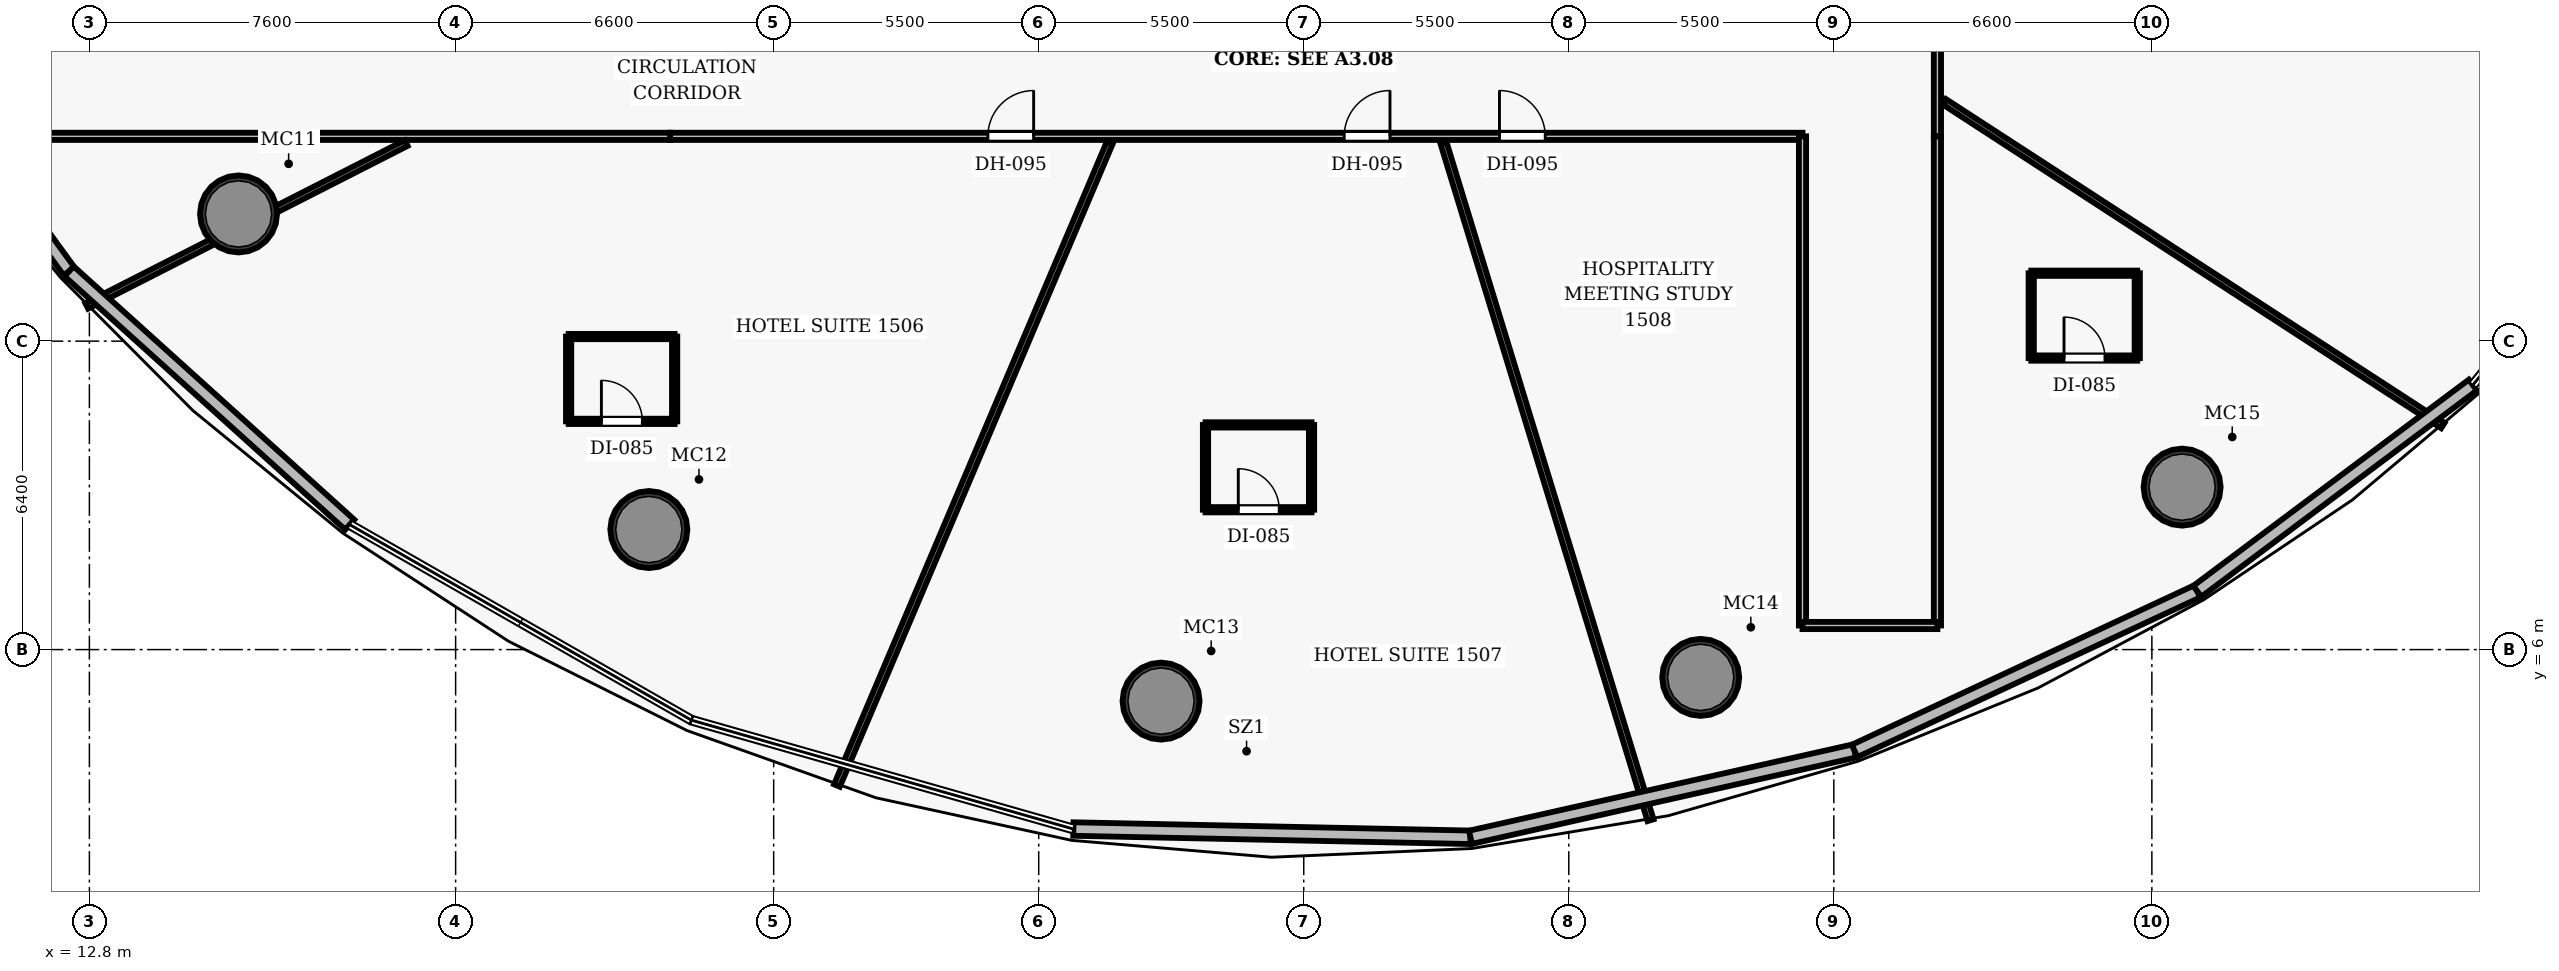
"""IFC4 building model, lengths in metres.
Left out: names, types, materials, properties, quantities, classifications, styles, units other than length and angle.
Written with IfcOpenShell. Run it as: python <this file> out.ifc"""

import sys

from ifc_helpers import new_model, si_unit, direction, frame, frame_2d, origin, origin_2d, place, context, subcontext, project, spatial, rectangle, hollow_circle, extrude, element, fill, save


model = new_model("IFC4")
c1 = context("Model", 3, precision=1e-05, world=origin(), true_north=direction((0.0, 1.0)))
c2 = subcontext(c1, "Body", "Model", "MODEL_VIEW")
j1 = project(units=[si_unit("LENGTHUNIT", "METRE"), si_unit("PLANEANGLEUNIT", "RADIAN")], contexts=[c1])
p1 = place(None, origin())
s1 = spatial("IfcSite", under=j1, at=p1, CompositionType="ELEMENT")
p2 = place(p1, origin())
s2 = spatial("IfcBuilding", under=s1, at=p2, CompositionType="ELEMENT")
p3 = place(p2, frame((0.0, 0.0, 69.4)))
s3 = spatial("IfcBuildingStorey", under=s2, at=p3, CompositionType="ELEMENT", Elevation=69.4)
for number, where, z_axis, x_axis in (
    (1, (15.895, 15.04, 0.0), (0.0, 0.0, 1.0), (1.0, 0.0, 0.0)),
    (2, (24.41, 8.491, 0.0), (0.0, 0.0, 1.0), (1.0, 0.0, 0.0)),
    (3, (35.039, 4.931, 0.0), (0.0, 0.0, 1.0), (1.0, 0.0, 0.0)),
    (4, (46.238, 5.423, 0.0), (0.0, 0.0, 1.0), (1.0, 0.0, 0.0)),
    (5, (56.228, 9.371, 0.0), (0.0, 0.0, 1.0), (1.0, 0.0, 0.0)),
):
    element("IfcColumn", number, at=place(p3, frame(where, z_axis=z_axis, x_axis=x_axis)), inside=s3, PredefinedType="COLUMN", context=c2, shape_type="SweptSolid", body=[
        extrude(hollow_circle(Radius=0.8, WallThickness=0.06, at=origin_2d()), origin(), (0.0, 0.0, 1.0), 3.5),
    ])
p4 = place(p3, frame((24.85, 16.65, 0.0), z_axis=(0.0, 0.0, 1.0), x_axis=(1.0, 0.0, 0.0)))
e6 = element("IfcWall", 6, at=p4, inside=s3, PredefinedType="PARTITIONING", context=c2, shape_type="SweptSolid", body=[
    extrude(rectangle(XDim=23.5, YDim=0.15, at=frame_2d((11.75, 0.0))), origin(), (0.0, 0.0, 1.0), 2.6),
])
p5 = place(p4, frame((6.595, 0.0, 0.0)))
e7 = element("IfcOpeningElement", 7, at=p5, cuts=e6, PredefinedType="OPENING", context=c2, shape_type="SweptSolid", body=[
    extrude(rectangle(XDim=0.95, YDim=2.15, at=frame_2d((0.475, 1.075))), frame((0.0, 0.085, 0.0), z_axis=(0.0, -1.0, 0.0), x_axis=(1.0, 0.0, 0.0)), (0.0, 0.0, 1.0), 0.17),
])
p6 = place(p4, frame((13.99, 0.0, 0.0)))
e8 = element("IfcOpeningElement", 8, at=p6, cuts=e6, PredefinedType="OPENING", context=c2, shape_type="SweptSolid", body=[
    extrude(rectangle(XDim=0.95, YDim=2.15, at=frame_2d((0.475, 1.075))), frame((0.0, 0.085, 0.0), z_axis=(0.0, -1.0, 0.0), x_axis=(1.0, 0.0, 0.0)), (0.0, 0.0, 1.0), 0.17),
])
p7 = place(p4, frame((17.211, 0.0, 0.0)))
e9 = element("IfcOpeningElement", 9, at=p7, cuts=e6, PredefinedType="OPENING", context=c2, shape_type="SweptSolid", body=[
    extrude(rectangle(XDim=0.95, YDim=2.15, at=frame_2d((0.475, 1.075))), frame((0.0, 0.085, 0.0), z_axis=(0.0, -1.0, 0.0), x_axis=(1.0, 0.0, 0.0)), (0.0, 0.0, 1.0), 0.17),
])
p8 = place(p3, frame((51.15, 16.65, 0.0), z_axis=(0.0, 0.0, 1.0), x_axis=(0.0, 1.0, 0.0)))
e10 = element("IfcWall", 10, at=p8, inside=s3, PredefinedType="PARTITIONING", context=c2, shape_type="SweptSolid", body=[
    extrude(rectangle(XDim=15.9, YDim=0.15, at=frame_2d((7.95, 0.0))), origin(), (0.0, 0.0, 1.0), 2.6),
])
p9 = place(p8, frame((11.512, 0.0, 0.0)))
e11 = element("IfcOpeningElement", 11, at=p9, cuts=e10, PredefinedType="OPENING", context=c2, shape_type="SweptSolid", body=[
    extrude(rectangle(XDim=0.95, YDim=2.15, at=frame_2d((0.475, 1.075))), frame((0.0, 0.085, 0.0), z_axis=(0.0, -1.0, 0.0), x_axis=(1.0, 0.0, 0.0)), (0.0, 0.0, 1.0), 0.17),
])
p10 = place(p8, frame((7.004, 0.0, 0.0)))
e12 = element("IfcOpeningElement", 12, at=p10, cuts=e10, PredefinedType="OPENING", context=c2, shape_type="SweptSolid", body=[
    extrude(rectangle(XDim=0.95, YDim=2.15, at=frame_2d((0.475, 1.075))), frame((0.0, 0.085, 0.0), z_axis=(0.0, -1.0, 0.0), x_axis=(1.0, 0.0, 0.0)), (0.0, 0.0, 1.0), 0.17),
])
p11 = place(p3, frame((10.948, 16.65, 0.0), z_axis=(0.0, 0.0, 1.0), x_axis=(1.0, 0.0, 0.0)))
e13 = element("IfcWall", 13, at=p11, inside=s3, PredefinedType="PARTITIONING", context=c2, shape_type="SweptSolid", body=[
    extrude(rectangle(XDim=13.902, YDim=0.15, at=frame_2d((6.951, 0.0))), origin(), (0.0, 0.0, 1.0), 2.6),
])
for number, where, z_axis, x_axis in (
    (14, (48.35, 6.5, 0.0), (0.0, 0.0, 1.0), (0.0, 1.0, 0.0)),
    (15, (51.15, 6.5, 0.0), (0.0, 0.0, 1.0), (0.0, 1.0, 0.0)),
):
    element("IfcWall", number, at=place(p3, frame(where, z_axis=z_axis, x_axis=x_axis)), inside=s3, PredefinedType="PARTITIONING", context=c2, shape_type="SweptSolid", body=[
        extrude(rectangle(XDim=10.15, YDim=0.15, at=frame_2d((5.075, 0.0))), origin(), (0.0, 0.0, 1.0), 2.6),
    ])
p12 = place(p3, frame((48.35, 6.5, 0.0), z_axis=(0.0, 0.0, 1.0), x_axis=(1.0, 0.0, 0.0)))
e16 = element("IfcWall", 16, at=p12, inside=s3, PredefinedType="PARTITIONING", context=c2, shape_type="SweptSolid", body=[
    extrude(rectangle(XDim=2.8, YDim=0.15, at=frame_2d((1.4, 0.0))), origin(), (0.0, 0.0, 1.0), 2.6),
])
p13 = place(p3, frame((19.375, 16.51, 0.0), z_axis=(0.0, 0.0, 1.0), x_axis=(-0.891002691838, -0.453998021073, 0.0)))
e17 = element("IfcWall", 17, at=p13, inside=s3, PredefinedType="PARTITIONING", context=c2, shape_type="SweptSolid", body=[
    extrude(rectangle(XDim=7.442, YDim=0.13, at=frame_2d((3.721, 0.0))), origin(), (0.0, 0.0, 1.0), 2.6),
])
p14 = place(p3, frame((33.972, 16.51, 0.0), z_axis=(0.0, 0.0, 1.0), x_axis=(-0.390724738728, -0.920507565719, 0.0)))
e18 = element("IfcWall", 18, at=p14, inside=s3, PredefinedType="PARTITIONING", context=c2, shape_type="SweptSolid", body=[
    extrude(rectangle(XDim=14.483, YDim=0.13, at=frame_2d((7.241, 0.0))), origin(), (0.0, 0.0, 1.0), 2.6),
])
p15 = place(p3, frame((40.901, 16.51, 0.0), z_axis=(0.0, 0.0, 1.0), x_axis=(0.292374733108, -0.956303830087, 0.0)))
e19 = element("IfcWall", 19, at=p15, inside=s3, PredefinedType="PARTITIONING", context=c2, shape_type="SweptSolid", body=[
    extrude(rectangle(XDim=14.692, YDim=0.13, at=frame_2d((7.346, 0.0))), origin(), (0.0, 0.0, 1.0), 2.6),
])
p16 = place(p3, frame((51.29, 17.369, 0.0), z_axis=(0.0, 0.0, 1.0), x_axis=(0.838662335308, -0.544651711955, 0.0)))
e20 = element("IfcWall", 20, at=p16, inside=s3, PredefinedType="PARTITIONING", context=c2, shape_type="SweptSolid", body=[
    extrude(rectangle(XDim=12.339, YDim=0.13, at=frame_2d((6.17, 0.0))), origin(), (0.0, 0.0, 1.0), 2.6),
])
p17 = place(p3, frame((22.745, 10.736, 0.0), z_axis=(0.0, 0.0, 1.0), x_axis=(1.0, 0.0, 0.0)))
e21 = element("IfcWall", 21, at=p17, inside=s3, PredefinedType="PARTITIONING", context=c2, shape_type="SweptSolid", body=[
    extrude(rectangle(XDim=2.2, YDim=0.11, at=frame_2d((1.1, 0.0))), origin(), (0.0, 0.0, 1.0), 2.6),
])
p18 = place(p17, frame((0.68, 0.0, 0.0)))
e22 = element("IfcOpeningElement", 22, at=p18, cuts=e21, PredefinedType="OPENING", context=c2, shape_type="SweptSolid", body=[
    extrude(rectangle(XDim=0.85, YDim=2.1, at=frame_2d((0.425, 1.05))), frame((0.0, 0.065, 0.0), z_axis=(0.0, -1.0, 0.0), x_axis=(1.0, 0.0, 0.0)), (0.0, 0.0, 1.0), 0.13),
])
p19 = place(p3, frame((22.745, 12.496, 0.0), z_axis=(0.0, 0.0, 1.0), x_axis=(1.0, 0.0, 0.0)))
e23 = element("IfcWall", 23, at=p19, inside=s3, PredefinedType="PARTITIONING", context=c2, shape_type="SweptSolid", body=[
    extrude(rectangle(XDim=2.2, YDim=0.11, at=frame_2d((1.1, 0.0))), origin(), (0.0, 0.0, 1.0), 2.6),
])
for number, where, z_axis, x_axis in (
    (24, (22.745, 10.736, 0.0), (0.0, 0.0, 1.0), (0.0, 1.0, 0.0)),
    (25, (24.945, 10.736, 0.0), (0.0, 0.0, 1.0), (0.0, 1.0, 0.0)),
):
    element("IfcWall", number, at=place(p3, frame(where, z_axis=z_axis, x_axis=x_axis)), inside=s3, PredefinedType="PARTITIONING", context=c2, shape_type="SweptSolid", body=[
        extrude(rectangle(XDim=1.76, YDim=0.11, at=frame_2d((0.88, 0.0))), origin(), (0.0, 0.0, 1.0), 2.6),
    ])
p20 = place(p3, frame((35.961, 8.902, 0.0), z_axis=(0.0, 0.0, 1.0), x_axis=(1.0, 0.0, 0.0)))
e26 = element("IfcWall", 26, at=p20, inside=s3, PredefinedType="PARTITIONING", context=c2, shape_type="SweptSolid", body=[
    extrude(rectangle(XDim=2.2, YDim=0.11, at=frame_2d((1.1, 0.0))), origin(), (0.0, 0.0, 1.0), 2.6),
])
p21 = place(p20, frame((0.68, 0.0, 0.0)))
e27 = element("IfcOpeningElement", 27, at=p21, cuts=e26, PredefinedType="OPENING", context=c2, shape_type="SweptSolid", body=[
    extrude(rectangle(XDim=0.85, YDim=2.1, at=frame_2d((0.425, 1.05))), frame((0.0, 0.065, 0.0), z_axis=(0.0, -1.0, 0.0), x_axis=(1.0, 0.0, 0.0)), (0.0, 0.0, 1.0), 0.13),
])
p22 = place(p3, frame((35.961, 10.662, 0.0), z_axis=(0.0, 0.0, 1.0), x_axis=(1.0, 0.0, 0.0)))
e28 = element("IfcWall", 28, at=p22, inside=s3, PredefinedType="PARTITIONING", context=c2, shape_type="SweptSolid", body=[
    extrude(rectangle(XDim=2.2, YDim=0.11, at=frame_2d((1.1, 0.0))), origin(), (0.0, 0.0, 1.0), 2.6),
])
for number, where, z_axis, x_axis in (
    (29, (35.961, 8.902, 0.0), (0.0, 0.0, 1.0), (0.0, 1.0, 0.0)),
    (30, (38.162, 8.902, 0.0), (0.0, 0.0, 1.0), (0.0, 1.0, 0.0)),
):
    element("IfcWall", number, at=place(p3, frame(where, z_axis=z_axis, x_axis=x_axis)), inside=s3, PredefinedType="PARTITIONING", context=c2, shape_type="SweptSolid", body=[
        extrude(rectangle(XDim=1.76, YDim=0.11, at=frame_2d((0.88, 0.0))), origin(), (0.0, 0.0, 1.0), 2.6),
    ])
p23 = place(p3, frame((53.097, 12.049, 0.0), z_axis=(0.0, 0.0, 1.0), x_axis=(1.0, 0.0, 0.0)))
e31 = element("IfcWall", 31, at=p23, inside=s3, PredefinedType="PARTITIONING", context=c2, shape_type="SweptSolid", body=[
    extrude(rectangle(XDim=2.2, YDim=0.11, at=frame_2d((1.1, 0.0))), origin(), (0.0, 0.0, 1.0), 2.6),
])
p24 = place(p23, frame((0.68, 0.0, 0.0)))
e32 = element("IfcOpeningElement", 32, at=p24, cuts=e31, PredefinedType="OPENING", context=c2, shape_type="SweptSolid", body=[
    extrude(rectangle(XDim=0.85, YDim=2.1, at=frame_2d((0.425, 1.05))), frame((0.0, 0.065, 0.0), z_axis=(0.0, -1.0, 0.0), x_axis=(1.0, 0.0, 0.0)), (0.0, 0.0, 1.0), 0.13),
])
p25 = place(p3, frame((53.097, 13.809, 0.0), z_axis=(0.0, 0.0, 1.0), x_axis=(1.0, 0.0, 0.0)))
e33 = element("IfcWall", 33, at=p25, inside=s3, PredefinedType="PARTITIONING", context=c2, shape_type="SweptSolid", body=[
    extrude(rectangle(XDim=2.2, YDim=0.11, at=frame_2d((1.1, 0.0))), origin(), (0.0, 0.0, 1.0), 2.6),
])
for number, where, z_axis, x_axis in (
    (34, (53.097, 12.049, 0.0), (0.0, 0.0, 1.0), (0.0, 1.0, 0.0)),
    (35, (55.297, 12.049, 0.0), (0.0, 0.0, 1.0), (0.0, 1.0, 0.0)),
):
    element("IfcWall", number, at=place(p3, frame(where, z_axis=z_axis, x_axis=x_axis)), inside=s3, PredefinedType="PARTITIONING", context=c2, shape_type="SweptSolid", body=[
        extrude(rectangle(XDim=1.76, YDim=0.11, at=frame_2d((0.88, 0.0))), origin(), (0.0, 0.0, 1.0), 2.6),
    ])
p26 = place(p3, frame((12.378, 13.849, 0.0), z_axis=(0.0, 0.0, 1.0), x_axis=(-0.589022914042, 0.808116332426, 0.0)))
e36 = element("IfcWall", 36, at=p26, inside=s3, PredefinedType="SOLIDWALL", context=c2, shape_type="SweptSolid", body=[
    extrude(rectangle(XDim=7.143, YDim=0.28, at=frame_2d((3.571, 0.0))), origin(), (0.0, 0.0, 1.0), 3.25),
])
p27 = place(p3, frame((18.202, 8.593, 0.0), z_axis=(0.0, 0.0, 1.0), x_axis=(-0.742344790323, 0.670018068623, 0.0)))
e37 = element("IfcWall", 37, at=p27, inside=s3, PredefinedType="SOLIDWALL", context=c2, shape_type="SweptSolid", body=[
    extrude(rectangle(XDim=7.845, YDim=0.28, at=frame_2d((3.922, 0.0))), origin(), (0.0, 0.0, 1.0), 3.25),
])
p28 = place(p3, frame((41.459, 2.105, 0.0), z_axis=(0.0, 0.0, 1.0), x_axis=(-0.999783120984, 0.020825729179, 0.0)))
e38 = element("IfcWall", 38, at=p28, inside=s3, PredefinedType="SOLIDWALL", context=c2, shape_type="SweptSolid", body=[
    extrude(rectangle(XDim=8.241, YDim=0.28, at=frame_2d((4.121, 0.0))), origin(), (0.0, 0.0, 1.0), 3.25),
])
p29 = place(p3, frame((49.431, 3.898, 0.0), z_axis=(0.0, 0.0, 1.0), x_axis=(-0.975627030245, -0.219435407023, 0.0)))
e39 = element("IfcWall", 39, at=p29, inside=s3, PredefinedType="SOLIDWALL", context=c2, shape_type="SweptSolid", body=[
    extrude(rectangle(XDim=8.171, YDim=0.28, at=frame_2d((4.085, 0.0))), origin(), (0.0, 0.0, 1.0), 3.25),
])
p30 = place(p3, frame((56.543, 7.209, 0.0), z_axis=(0.0, 0.0, 1.0), x_axis=(-0.90655249664, -0.422093083142, 0.0)))
e40 = element("IfcWall", 40, at=p30, inside=s3, PredefinedType="SOLIDWALL", context=c2, shape_type="SweptSolid", body=[
    extrude(rectangle(XDim=7.845, YDim=0.28, at=frame_2d((3.922, 0.0))), origin(), (0.0, 0.0, 1.0), 3.25),
])
p31 = place(p3, frame((62.261, 11.489, 0.0), z_axis=(0.0, 0.0, 1.0), x_axis=(-0.800594336171, -0.599206733015, 0.0)))
e41 = element("IfcWall", 41, at=p31, inside=s3, PredefinedType="SOLIDWALL", context=c2, shape_type="SweptSolid", body=[
    extrude(rectangle(XDim=7.143, YDim=0.28, at=frame_2d((3.571, 0.0))), origin(), (0.0, 0.0, 1.0), 3.25),
])
p32 = place(p5, origin())
e42 = element("IfcDoor", 42, at=p32, inside=s3, OperationType="SINGLE_SWING_RIGHT", PredefinedType="DOOR", context=c2, shape_type="SweptSolid", body=[
    extrude(rectangle(XDim=0.95, YDim=2.15, at=frame_2d((0.475, 1.075))), frame((0.0, 0.025, 0.0), z_axis=(0.0, -1.0, 0.0), x_axis=(1.0, 0.0, 0.0)), (0.0, 0.0, 1.0), 0.05),
])
fill(e7, e42)
p33 = place(p18, origin())
e43 = element("IfcDoor", 43, at=p33, inside=s3, OperationType="SINGLE_SWING_LEFT", PredefinedType="DOOR", context=c2, shape_type="SweptSolid", body=[
    extrude(rectangle(XDim=0.85, YDim=2.1, at=frame_2d((0.425, 1.05))), frame((0.0, 0.025, 0.0), z_axis=(0.0, -1.0, 0.0), x_axis=(1.0, 0.0, 0.0)), (0.0, 0.0, 1.0), 0.05),
])
fill(e22, e43)
p34 = place(p6, origin())
e44 = element("IfcDoor", 44, at=p34, inside=s3, OperationType="SINGLE_SWING_RIGHT", PredefinedType="DOOR", context=c2, shape_type="SweptSolid", body=[
    extrude(rectangle(XDim=0.95, YDim=2.15, at=frame_2d((0.475, 1.075))), frame((0.0, 0.025, 0.0), z_axis=(0.0, -1.0, 0.0), x_axis=(1.0, 0.0, 0.0)), (0.0, 0.0, 1.0), 0.05),
])
fill(e8, e44)
p35 = place(p21, origin())
e45 = element("IfcDoor", 45, at=p35, inside=s3, OperationType="SINGLE_SWING_LEFT", PredefinedType="DOOR", context=c2, shape_type="SweptSolid", body=[
    extrude(rectangle(XDim=0.85, YDim=2.1, at=frame_2d((0.425, 1.05))), frame((0.0, 0.025, 0.0), z_axis=(0.0, -1.0, 0.0), x_axis=(1.0, 0.0, 0.0)), (0.0, 0.0, 1.0), 0.05),
])
fill(e27, e45)
p36 = place(p7, origin())
e46 = element("IfcDoor", 46, at=p36, inside=s3, OperationType="SINGLE_SWING_LEFT", PredefinedType="DOOR", context=c2, shape_type="SweptSolid", body=[
    extrude(rectangle(XDim=0.95, YDim=2.15, at=frame_2d((0.475, 1.075))), frame((0.0, 0.025, 0.0), z_axis=(0.0, -1.0, 0.0), x_axis=(1.0, 0.0, 0.0)), (0.0, 0.0, 1.0), 0.05),
])
fill(e9, e46)
p37 = place(p24, origin())
e47 = element("IfcDoor", 47, at=p37, inside=s3, OperationType="SINGLE_SWING_LEFT", PredefinedType="DOOR", context=c2, shape_type="SweptSolid", body=[
    extrude(rectangle(XDim=0.85, YDim=2.1, at=frame_2d((0.425, 1.05))), frame((0.0, 0.025, 0.0), z_axis=(0.0, -1.0, 0.0), x_axis=(1.0, 0.0, 0.0)), (0.0, 0.0, 1.0), 0.05),
])
fill(e32, e47)
save(model, sys.argv[1])
